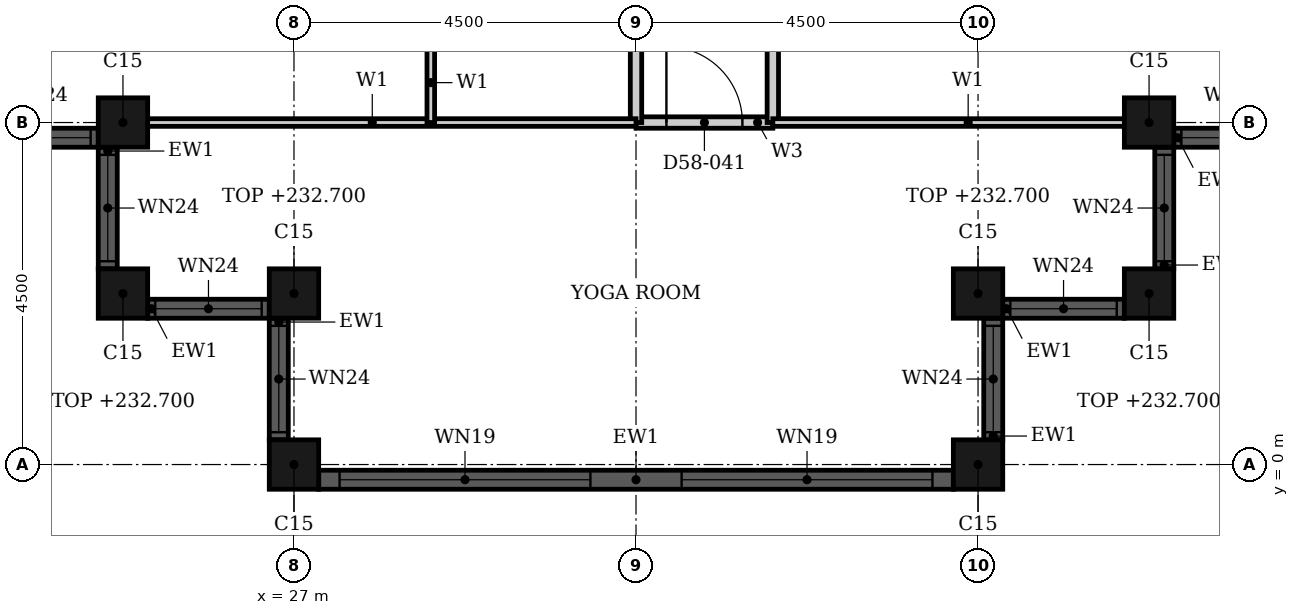
"""IFC4 building model, lengths in metres.
Left out: names, types, materials, properties, quantities, classifications, styles, units other than length and angle.
Written with IfcOpenShell. Run it as: python <this file> out.ifc"""

import sys

from ifc_helpers import new_model, si_unit, direction, frame, frame_2d, origin, origin_2d, place, context, subcontext, project, spatial, rectangle, hollow_rectangle, extrude, element, fill, save


model = new_model("IFC4")
c1 = context("Model", 3, precision=1e-05, world=origin(), true_north=direction((0.0, 1.0)))
c2 = subcontext(c1, "Body", "Model", "MODEL_VIEW")
j1 = project(units=[si_unit("LENGTHUNIT", "METRE"), si_unit("PLANEANGLEUNIT", "RADIAN")], contexts=[c1])
p1 = place(None, origin())
s1 = spatial("IfcSite", under=j1, at=p1, CompositionType="ELEMENT")
p2 = place(p1, origin())
s2 = spatial("IfcBuilding", under=s1, at=p2, CompositionType="ELEMENT")
p3 = place(p2, frame((0.0, 0.0, 229.4)))
s3 = spatial("IfcBuildingStorey", under=s2, at=p3, CompositionType="ELEMENT", Elevation=229.4)
for number, where, z_axis, x_axis in (
    (1, (24.75, 4.5, 0.0), (0.0, 0.0, 1.0), (1.0, 0.0, 0.0)),
    (2, (24.75, 2.25, 0.0), (0.0, 0.0, 1.0), (1.0, 0.0, 0.0)),
    (3, (27.0, 2.25, 0.0), (0.0, 0.0, 1.0), (1.0, 0.0, 0.0)),
    (4, (27.0, 0.0, 0.0), (0.0, 0.0, 1.0), (1.0, 0.0, 0.0)),
    (5, (36.0, 0.0, 0.0), (0.0, 0.0, 1.0), (1.0, 0.0, 0.0)),
    (6, (36.0, 2.25, 0.0), (0.0, 0.0, 1.0), (1.0, 0.0, 0.0)),
    (7, (38.25, 2.25, 0.0), (0.0, 0.0, 1.0), (1.0, 0.0, 0.0)),
    (8, (38.25, 4.5, 0.0), (0.0, 0.0, 1.0), (1.0, 0.0, 0.0)),
):
    element("IfcColumn", number, at=place(p3, frame(where, z_axis=z_axis, x_axis=x_axis)), inside=s3, PredefinedType="COLUMN", context=c2, shape_type="SweptSolid", body=[
        extrude(hollow_rectangle(XDim=0.65, YDim=0.65, WallThickness=0.021, at=origin_2d()), origin(), (0.0, 0.0, 1.0), 3.3),
    ])
p4 = place(p3, frame((22.825, 4.3, 0.0), z_axis=(0.0, 0.0, 1.0), x_axis=(1.0, 0.0, 0.0)))
e9 = element("IfcWall", 9, at=p4, inside=s3, PredefinedType="SOLIDWALL", context=c2, shape_type="SweptSolid", body=[
    extrude(rectangle(XDim=1.6, YDim=0.25, at=frame_2d((0.8, 0.0))), origin(), (0.0, 0.0, 1.0), 3.7),
])
p5 = place(p4, frame((0.1, 0.0, 0.9)))
e10 = element("IfcOpeningElement", 10, at=p5, cuts=e9, PredefinedType="OPENING", context=c2, shape_type="SweptSolid", body=[
    extrude(rectangle(XDim=1.4, YDim=1.75, at=frame_2d((0.7, 0.875))), frame((0.0, 0.135, 0.0), z_axis=(0.0, -1.0, 0.0), x_axis=(1.0, 0.0, 0.0)), (0.0, 0.0, 1.0), 0.27),
])
p6 = place(p3, frame((24.55, 4.175, 0.0), z_axis=(0.0, 0.0, 1.0), x_axis=(0.0, -1.0, 0.0)))
e11 = element("IfcWall", 11, at=p6, inside=s3, PredefinedType="SOLIDWALL", context=c2, shape_type="SweptSolid", body=[
    extrude(rectangle(XDim=1.6, YDim=0.25, at=frame_2d((0.8, 0.0))), origin(), (0.0, 0.0, 1.0), 3.7),
])
p7 = place(p6, frame((0.1, 0.0, 0.9)))
e12 = element("IfcOpeningElement", 12, at=p7, cuts=e11, PredefinedType="OPENING", context=c2, shape_type="SweptSolid", body=[
    extrude(rectangle(XDim=1.4, YDim=1.75, at=frame_2d((0.7, 0.875))), frame((0.0, 0.135, 0.0), z_axis=(0.0, -1.0, 0.0), x_axis=(1.0, 0.0, 0.0)), (0.0, 0.0, 1.0), 0.27),
])
p8 = place(p3, frame((25.075, 2.05, 0.0), z_axis=(0.0, 0.0, 1.0), x_axis=(1.0, 0.0, 0.0)))
e13 = element("IfcWall", 13, at=p8, inside=s3, PredefinedType="SOLIDWALL", context=c2, shape_type="SweptSolid", body=[
    extrude(rectangle(XDim=1.6, YDim=0.25, at=frame_2d((0.8, 0.0))), origin(), (0.0, 0.0, 1.0), 3.7),
])
p9 = place(p8, frame((0.1, 0.0, 0.9)))
e14 = element("IfcOpeningElement", 14, at=p9, cuts=e13, PredefinedType="OPENING", context=c2, shape_type="SweptSolid", body=[
    extrude(rectangle(XDim=1.4, YDim=1.75, at=frame_2d((0.7, 0.875))), frame((0.0, 0.135, 0.0), z_axis=(0.0, -1.0, 0.0), x_axis=(1.0, 0.0, 0.0)), (0.0, 0.0, 1.0), 0.27),
])
p10 = place(p3, frame((26.8, 1.925, 0.0), z_axis=(0.0, 0.0, 1.0), x_axis=(0.0, -1.0, 0.0)))
e15 = element("IfcWall", 15, at=p10, inside=s3, PredefinedType="SOLIDWALL", context=c2, shape_type="SweptSolid", body=[
    extrude(rectangle(XDim=1.6, YDim=0.25, at=frame_2d((0.8, 0.0))), origin(), (0.0, 0.0, 1.0), 3.7),
])
p11 = place(p10, frame((0.1, 0.0, 0.9)))
e16 = element("IfcOpeningElement", 16, at=p11, cuts=e15, PredefinedType="OPENING", context=c2, shape_type="SweptSolid", body=[
    extrude(rectangle(XDim=1.4, YDim=1.75, at=frame_2d((0.7, 0.875))), frame((0.0, 0.135, 0.0), z_axis=(0.0, -1.0, 0.0), x_axis=(1.0, 0.0, 0.0)), (0.0, 0.0, 1.0), 0.27),
])
p12 = place(p3, frame((27.325, -0.2, 0.0), z_axis=(0.0, 0.0, 1.0), x_axis=(1.0, 0.0, 0.0)))
e17 = element("IfcWall", 17, at=p12, inside=s3, PredefinedType="SOLIDWALL", context=c2, shape_type="SweptSolid", body=[
    extrude(rectangle(XDim=8.35, YDim=0.25, at=frame_2d((4.175, 0.0))), origin(), (0.0, 0.0, 1.0), 3.7),
])
p13 = place(p12, frame((0.275, 0.0, 0.45)))
e18 = element("IfcOpeningElement", 18, at=p13, cuts=e17, PredefinedType="OPENING", context=c2, shape_type="SweptSolid", body=[
    extrude(rectangle(XDim=3.3, YDim=2.2, at=frame_2d((1.65, 1.1))), frame((0.0, 0.135, 0.0), z_axis=(0.0, -1.0, 0.0), x_axis=(1.0, 0.0, 0.0)), (0.0, 0.0, 1.0), 0.27),
])
p14 = place(p12, frame((4.775, 0.0, 0.45)))
e19 = element("IfcOpeningElement", 19, at=p14, cuts=e17, PredefinedType="OPENING", context=c2, shape_type="SweptSolid", body=[
    extrude(rectangle(XDim=3.3, YDim=2.2, at=frame_2d((1.65, 1.1))), frame((0.0, 0.135, 0.0), z_axis=(0.0, -1.0, 0.0), x_axis=(1.0, 0.0, 0.0)), (0.0, 0.0, 1.0), 0.27),
])
p15 = place(p3, frame((36.2, 0.325, 0.0), z_axis=(0.0, 0.0, 1.0), x_axis=(0.0, 1.0, 0.0)))
e20 = element("IfcWall", 20, at=p15, inside=s3, PredefinedType="SOLIDWALL", context=c2, shape_type="SweptSolid", body=[
    extrude(rectangle(XDim=1.6, YDim=0.25, at=frame_2d((0.8, 0.0))), origin(), (0.0, 0.0, 1.0), 3.7),
])
p16 = place(p15, frame((0.1, 0.0, 0.9)))
e21 = element("IfcOpeningElement", 21, at=p16, cuts=e20, PredefinedType="OPENING", context=c2, shape_type="SweptSolid", body=[
    extrude(rectangle(XDim=1.4, YDim=1.75, at=frame_2d((0.7, 0.875))), frame((0.0, 0.135, 0.0), z_axis=(0.0, -1.0, 0.0), x_axis=(1.0, 0.0, 0.0)), (0.0, 0.0, 1.0), 0.27),
])
p17 = place(p3, frame((36.325, 2.05, 0.0), z_axis=(0.0, 0.0, 1.0), x_axis=(1.0, 0.0, 0.0)))
e22 = element("IfcWall", 22, at=p17, inside=s3, PredefinedType="SOLIDWALL", context=c2, shape_type="SweptSolid", body=[
    extrude(rectangle(XDim=1.6, YDim=0.25, at=frame_2d((0.8, 0.0))), origin(), (0.0, 0.0, 1.0), 3.7),
])
p18 = place(p17, frame((0.1, 0.0, 0.9)))
e23 = element("IfcOpeningElement", 23, at=p18, cuts=e22, PredefinedType="OPENING", context=c2, shape_type="SweptSolid", body=[
    extrude(rectangle(XDim=1.4, YDim=1.75, at=frame_2d((0.7, 0.875))), frame((0.0, 0.135, 0.0), z_axis=(0.0, -1.0, 0.0), x_axis=(1.0, 0.0, 0.0)), (0.0, 0.0, 1.0), 0.27),
])
p19 = place(p3, frame((38.45, 2.575, 0.0), z_axis=(0.0, 0.0, 1.0), x_axis=(0.0, 1.0, 0.0)))
e24 = element("IfcWall", 24, at=p19, inside=s3, PredefinedType="SOLIDWALL", context=c2, shape_type="SweptSolid", body=[
    extrude(rectangle(XDim=1.6, YDim=0.25, at=frame_2d((0.8, 0.0))), origin(), (0.0, 0.0, 1.0), 3.7),
])
p20 = place(p19, frame((0.1, 0.0, 0.9)))
e25 = element("IfcOpeningElement", 25, at=p20, cuts=e24, PredefinedType="OPENING", context=c2, shape_type="SweptSolid", body=[
    extrude(rectangle(XDim=1.4, YDim=1.75, at=frame_2d((0.7, 0.875))), frame((0.0, 0.135, 0.0), z_axis=(0.0, -1.0, 0.0), x_axis=(1.0, 0.0, 0.0)), (0.0, 0.0, 1.0), 0.27),
])
p21 = place(p3, frame((38.575, 4.3, 0.0), z_axis=(0.0, 0.0, 1.0), x_axis=(1.0, 0.0, 0.0)))
e26 = element("IfcWall", 26, at=p21, inside=s3, PredefinedType="SOLIDWALL", context=c2, shape_type="SweptSolid", body=[
    extrude(rectangle(XDim=1.6, YDim=0.25, at=frame_2d((0.8, 0.0))), origin(), (0.0, 0.0, 1.0), 3.7),
])
p22 = place(p21, frame((0.1, 0.0, 0.9)))
e27 = element("IfcOpeningElement", 27, at=p22, cuts=e26, PredefinedType="OPENING", context=c2, shape_type="SweptSolid", body=[
    extrude(rectangle(XDim=1.4, YDim=1.75, at=frame_2d((0.7, 0.875))), frame((0.0, 0.135, 0.0), z_axis=(0.0, -1.0, 0.0), x_axis=(1.0, 0.0, 0.0)), (0.0, 0.0, 1.0), 0.27),
])
p23 = place(p3, frame((31.5, 4.5, 0.0), z_axis=(0.0, 0.0, 1.0), x_axis=(1.0, 0.0, 0.0)))
e28 = element("IfcWall", 28, at=p23, inside=s3, PredefinedType="PARTITIONING", context=c2, shape_type="SweptSolid", body=[
    extrude(rectangle(XDim=1.8, YDim=0.15, at=frame_2d((0.9, 0.0))), origin(), (0.0, 0.0, 1.0), 3.3),
])
p24 = place(p23, frame((0.4, 0.0, 0.0)))
e29 = element("IfcOpeningElement", 29, at=p24, cuts=e28, PredefinedType="OPENING", context=c2, shape_type="SweptSolid", body=[
    extrude(rectangle(XDim=1.0, YDim=2.1, at=frame_2d((0.5, 1.05))), frame((0.0, 0.085, 0.0), z_axis=(0.0, -1.0, 0.0), x_axis=(1.0, 0.0, 0.0)), (0.0, 0.0, 1.0), 0.17),
])
p25 = place(p3, frame((31.5, 4.5, 0.0), z_axis=(0.0, 0.0, 1.0), x_axis=(0.0, 1.0, 0.0)))
e30 = element("IfcWall", 30, at=p25, inside=s3, PredefinedType="PARTITIONING", context=c2, shape_type="SweptSolid", body=[
    extrude(rectangle(XDim=6.6, YDim=0.15, at=frame_2d((3.3, 0.0))), origin(), (0.0, 0.0, 1.0), 2.58),
])
p26 = place(p25, frame((4.3, 0.0, 0.0)))
e31 = element("IfcOpeningElement", 31, at=p26, cuts=e30, PredefinedType="OPENING", context=c2, shape_type="SweptSolid", body=[
    extrude(rectangle(XDim=1.0, YDim=2.2, at=frame_2d((0.5, 1.1))), frame((0.0, 0.085, 0.0), z_axis=(0.0, -1.0, 0.0), x_axis=(1.0, 0.0, 0.0)), (0.0, 0.0, 1.0), 0.17),
])
p27 = place(p3, frame((33.3, 4.5, 0.0), z_axis=(0.0, 0.0, 1.0), x_axis=(0.0, 1.0, 0.0)))
e32 = element("IfcWall", 32, at=p27, inside=s3, PredefinedType="PARTITIONING", context=c2, shape_type="SweptSolid", body=[
    extrude(rectangle(XDim=16.199, YDim=0.15, at=frame_2d((8.1, 0.0))), origin(), (0.0, 0.0, 1.0), 3.3),
])
p28 = place(p27, frame((12.099, 0.0, 0.0)))
e33 = element("IfcOpeningElement", 33, at=p28, cuts=e32, PredefinedType="OPENING", context=c2, shape_type="SweptSolid", body=[
    extrude(rectangle(XDim=1.0, YDim=2.2, at=frame_2d((0.5, 1.1))), frame((0.0, 0.085, 0.0), z_axis=(0.0, -1.0, 0.0), x_axis=(1.0, 0.0, 0.0)), (0.0, 0.0, 1.0), 0.17),
])
p29 = place(p27, frame((4.0, 0.0, 0.0)))
e34 = element("IfcOpeningElement", 34, at=p29, cuts=e32, PredefinedType="OPENING", context=c2, shape_type="SweptSolid", body=[
    extrude(rectangle(XDim=1.0, YDim=2.1, at=frame_2d((0.5, 1.05))), frame((0.0, 0.085, 0.0), z_axis=(0.0, -1.0, 0.0), x_axis=(1.0, 0.0, 0.0)), (0.0, 0.0, 1.0), 0.17),
])
p30 = place(p3, frame((33.3, 4.5, 0.0), z_axis=(0.0, 0.0, 1.0), x_axis=(1.0, 0.0, 0.0)))
e35 = element("IfcWall", 35, at=p30, inside=s3, PredefinedType="PARTITIONING", context=c2, shape_type="SweptSolid", body=[
    extrude(rectangle(XDim=5.14, YDim=0.1, at=frame_2d((2.57, 0.0))), origin(), (0.0, 0.0, 1.0), 3.3),
])
p31 = place(p3, frame((24.56, 4.5, 0.0), z_axis=(0.0, 0.0, 1.0), x_axis=(1.0, 0.0, 0.0)))
e36 = element("IfcWall", 36, at=p31, inside=s3, PredefinedType="PARTITIONING", context=c2, shape_type="SweptSolid", body=[
    extrude(rectangle(XDim=6.94, YDim=0.1, at=frame_2d((3.47, 0.0))), origin(), (0.0, 0.0, 1.0), 3.3),
])
p32 = place(p3, frame((28.8, 4.5, 0.0), z_axis=(0.0, 0.0, 1.0), x_axis=(0.0, 1.0, 0.0)))
e37 = element("IfcWall", 37, at=p32, inside=s3, PredefinedType="PARTITIONING", context=c2, shape_type="SweptSolid", body=[
    extrude(rectangle(XDim=3.0, YDim=0.1, at=frame_2d((1.5, 0.0))), origin(), (0.0, 0.0, 1.0), 3.3),
])
p33 = place(p32, frame((1.05, 0.0, 0.0)))
e38 = element("IfcOpeningElement", 38, at=p33, cuts=e37, PredefinedType="OPENING", context=c2, shape_type="SweptSolid", body=[
    extrude(rectangle(XDim=0.9, YDim=2.1, at=frame_2d((0.45, 1.05))), frame((0.0, 0.06, 0.0), z_axis=(0.0, -1.0, 0.0), x_axis=(1.0, 0.0, 0.0)), (0.0, 0.0, 1.0), 0.12),
])
p34 = place(p5, origin())
e39 = element("IfcWindow", 39, at=p34, inside=s3, PartitioningType="SINGLE_PANEL", PredefinedType="WINDOW", context=c2, shape_type="SweptSolid", body=[
    extrude(rectangle(XDim=1.4, YDim=1.75, at=frame_2d((0.7, 0.875))), frame((0.0, 0.03, 0.0), z_axis=(0.0, -1.0, 0.0), x_axis=(1.0, 0.0, 0.0)), (0.0, 0.0, 1.0), 0.06),
])
fill(e10, e39)
p35 = place(p7, origin())
e40 = element("IfcWindow", 40, at=p35, inside=s3, PartitioningType="SINGLE_PANEL", PredefinedType="WINDOW", context=c2, shape_type="SweptSolid", body=[
    extrude(rectangle(XDim=1.4, YDim=1.75, at=frame_2d((0.7, 0.875))), frame((0.0, 0.03, 0.0), z_axis=(0.0, -1.0, 0.0), x_axis=(1.0, 0.0, 0.0)), (0.0, 0.0, 1.0), 0.06),
])
fill(e12, e40)
p36 = place(p9, origin())
e41 = element("IfcWindow", 41, at=p36, inside=s3, PartitioningType="SINGLE_PANEL", PredefinedType="WINDOW", context=c2, shape_type="SweptSolid", body=[
    extrude(rectangle(XDim=1.4, YDim=1.75, at=frame_2d((0.7, 0.875))), frame((0.0, 0.03, 0.0), z_axis=(0.0, -1.0, 0.0), x_axis=(1.0, 0.0, 0.0)), (0.0, 0.0, 1.0), 0.06),
])
fill(e14, e41)
p37 = place(p11, origin())
e42 = element("IfcWindow", 42, at=p37, inside=s3, PartitioningType="SINGLE_PANEL", PredefinedType="WINDOW", context=c2, shape_type="SweptSolid", body=[
    extrude(rectangle(XDim=1.4, YDim=1.75, at=frame_2d((0.7, 0.875))), frame((0.0, 0.03, 0.0), z_axis=(0.0, -1.0, 0.0), x_axis=(1.0, 0.0, 0.0)), (0.0, 0.0, 1.0), 0.06),
])
fill(e16, e42)
p38 = place(p13, origin())
e43 = element("IfcWindow", 43, at=p38, inside=s3, PartitioningType="SINGLE_PANEL", PredefinedType="WINDOW", context=c2, shape_type="SweptSolid", body=[
    extrude(rectangle(XDim=3.3, YDim=2.2, at=frame_2d((1.65, 1.1))), frame((0.0, 0.03, 0.0), z_axis=(0.0, -1.0, 0.0), x_axis=(1.0, 0.0, 0.0)), (0.0, 0.0, 1.0), 0.06),
])
fill(e18, e43)
p39 = place(p14, origin())
e44 = element("IfcWindow", 44, at=p39, inside=s3, PartitioningType="SINGLE_PANEL", PredefinedType="WINDOW", context=c2, shape_type="SweptSolid", body=[
    extrude(rectangle(XDim=3.3, YDim=2.2, at=frame_2d((1.65, 1.1))), frame((0.0, 0.03, 0.0), z_axis=(0.0, -1.0, 0.0), x_axis=(1.0, 0.0, 0.0)), (0.0, 0.0, 1.0), 0.06),
])
fill(e19, e44)
p40 = place(p16, origin())
e45 = element("IfcWindow", 45, at=p40, inside=s3, PartitioningType="SINGLE_PANEL", PredefinedType="WINDOW", context=c2, shape_type="SweptSolid", body=[
    extrude(rectangle(XDim=1.4, YDim=1.75, at=frame_2d((0.7, 0.875))), frame((0.0, 0.03, 0.0), z_axis=(0.0, -1.0, 0.0), x_axis=(1.0, 0.0, 0.0)), (0.0, 0.0, 1.0), 0.06),
])
fill(e21, e45)
p41 = place(p18, origin())
e46 = element("IfcWindow", 46, at=p41, inside=s3, PartitioningType="SINGLE_PANEL", PredefinedType="WINDOW", context=c2, shape_type="SweptSolid", body=[
    extrude(rectangle(XDim=1.4, YDim=1.75, at=frame_2d((0.7, 0.875))), frame((0.0, 0.03, 0.0), z_axis=(0.0, -1.0, 0.0), x_axis=(1.0, 0.0, 0.0)), (0.0, 0.0, 1.0), 0.06),
])
fill(e23, e46)
p42 = place(p20, origin())
e47 = element("IfcWindow", 47, at=p42, inside=s3, PartitioningType="SINGLE_PANEL", PredefinedType="WINDOW", context=c2, shape_type="SweptSolid", body=[
    extrude(rectangle(XDim=1.4, YDim=1.75, at=frame_2d((0.7, 0.875))), frame((0.0, 0.03, 0.0), z_axis=(0.0, -1.0, 0.0), x_axis=(1.0, 0.0, 0.0)), (0.0, 0.0, 1.0), 0.06),
])
fill(e25, e47)
p43 = place(p22, origin())
e48 = element("IfcWindow", 48, at=p43, inside=s3, PartitioningType="SINGLE_PANEL", PredefinedType="WINDOW", context=c2, shape_type="SweptSolid", body=[
    extrude(rectangle(XDim=1.4, YDim=1.75, at=frame_2d((0.7, 0.875))), frame((0.0, 0.03, 0.0), z_axis=(0.0, -1.0, 0.0), x_axis=(1.0, 0.0, 0.0)), (0.0, 0.0, 1.0), 0.06),
])
fill(e27, e48)
p44 = place(p24, origin())
e49 = element("IfcDoor", 49, at=p44, inside=s3, OperationType="SINGLE_SWING_RIGHT", PredefinedType="DOOR", context=c2, shape_type="SweptSolid", body=[
    extrude(rectangle(XDim=1.0, YDim=2.1, at=frame_2d((0.5, 1.05))), frame((0.0, 0.025, 0.0), z_axis=(0.0, -1.0, 0.0), x_axis=(1.0, 0.0, 0.0)), (0.0, 0.0, 1.0), 0.05),
])
fill(e29, e49)
save(model, sys.argv[1])
